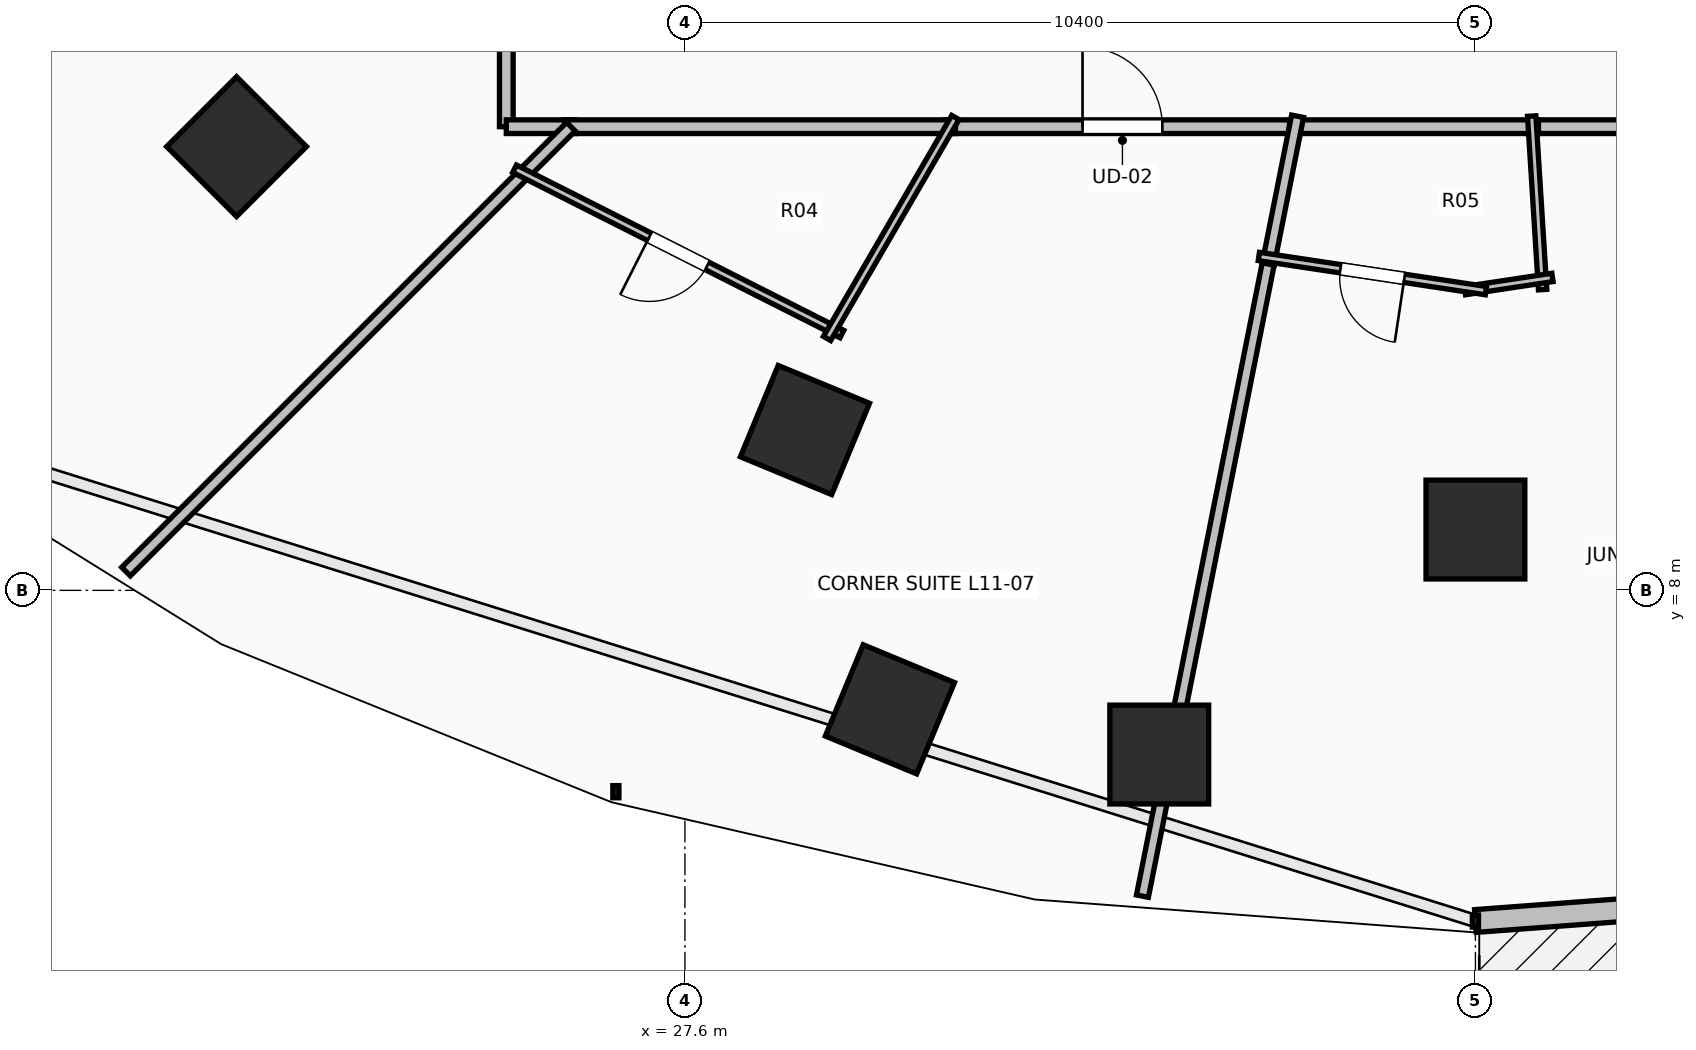
"""IFC4 building model, lengths in metres.
Left out: names, types, materials, properties, quantities, classifications, styles, units other than length and angle.
Written with IfcOpenShell. Run it as: python <this file> out.ifc"""

import sys

from ifc_helpers import new_model, si_unit, direction, frame, frame_2d, origin, origin_2d, place, context, subcontext, project, spatial, rectangle, extrude, element, fill, save


model = new_model("IFC4")
c1 = context("Model", 3, precision=1e-05, world=origin(), true_north=direction((0.0, 1.0)))
c2 = subcontext(c1, "Body", "Model", "MODEL_VIEW")
j1 = project(units=[si_unit("LENGTHUNIT", "METRE"), si_unit("PLANEANGLEUNIT", "RADIAN")], contexts=[c1])
p1 = place(None, origin())
s1 = spatial("IfcSite", under=j1, at=p1, CompositionType="ELEMENT")
p2 = place(p1, origin())
s2 = spatial("IfcBuilding", under=s1, at=p2, CompositionType="ELEMENT")
p3 = place(p2, frame((0.0, 0.0, 45.0)))
s3 = spatial("IfcBuildingStorey", under=s2, at=p3, CompositionType="ELEMENT", Elevation=45.0)
for number, where, z_axis, x_axis in (
    (1, (21.701, 13.838, 0.0), (0.0, 0.0, 1.0), (-0.707, -0.707, 0.0)),
    (2, (29.179, 10.109, 0.0), (0.0, 0.0, 1.0), (-0.383, -0.924, 0.0)),
    (3, (38.0, 8.8, 0.0), (0.0, 0.0, 1.0), (0.0, -1.0, 0.0)),
    (4, (30.297, 6.435, 0.0), (0.0, 0.0, 1.0), (-0.383, -0.924, 0.0)),
    (5, (33.84, 5.84, 0.0), (0.0, 0.0, 1.0), (0.0, -1.0, 0.0)),
):
    element("IfcColumn", number, at=place(p3, frame(where, z_axis=z_axis, x_axis=x_axis)), inside=s3, PredefinedType="COLUMN", context=c2, shape_type="SweptSolid", body=[
        extrude(rectangle(XDim=1.3, YDim=1.3, at=origin_2d()), origin(), (0.0, 0.0, 1.0), 3.5),
    ])
p4 = place(p3, frame((38.0, 3.65, 0.0), z_axis=(0.0, 0.0, 1.0), x_axis=(0.99723690101, 0.074287032943, 0.0)))
e6 = element("IfcWall", 6, at=p4, inside=s3, PredefinedType="STANDARD", context=c2, shape_type="SweptSolid", body=[
    extrude(rectangle(XDim=5.781, YDim=0.3, at=frame_2d((2.89, 0.0))), origin(), (0.0, 0.0, 1.0), 3.24),
])
p5 = place(p4, frame((2.09, 0.0, 0.0)))
e7 = element("IfcOpeningElement", 7, at=p5, cuts=e6, PredefinedType="OPENING", context=c2, shape_type="SweptSolid", body=[
    extrude(rectangle(XDim=1.6, YDim=2.3, at=frame_2d((0.8, 1.15))), frame((0.0, 0.165, 0.0), z_axis=(0.0, -1.0, 0.0), x_axis=(1.0, 0.0, 0.0)), (0.0, 0.0, 1.0), 0.33),
])
p6 = place(p3, frame((25.25, 19.814, 0.0), z_axis=(0.0, 0.0, 1.0), x_axis=(0.0, -1.0, 0.0)))
e8 = element("IfcWall", 8, at=p6, inside=s3, PredefinedType="PARTITIONING", context=c2, shape_type="SweptSolid", body=[
    extrude(rectangle(XDim=5.714, YDim=0.18, at=frame_2d((2.857, 0.0))), origin(), (0.0, 0.0, 1.0), 2.432),
])
p7 = place(p6, frame((2.332, 0.0, 0.0)))
e9 = element("IfcOpeningElement", 9, at=p7, cuts=e8, PredefinedType="OPENING", context=c2, shape_type="SweptSolid", body=[
    extrude(rectangle(XDim=1.05, YDim=2.2, at=frame_2d((0.525, 1.1))), frame((0.0, 0.105, 0.0), z_axis=(0.0, -1.0, 0.0), x_axis=(1.0, 0.0, 0.0)), (0.0, 0.0, 1.0), 0.21),
])
p8 = place(p3, frame((25.25, 14.1, 0.0), z_axis=(0.0, 0.0, 1.0), x_axis=(1.0, 0.0, 0.0)))
e10 = element("IfcWall", 10, at=p8, inside=s3, PredefinedType="PARTITIONING", context=c2, shape_type="SweptSolid", body=[
    extrude(rectangle(XDim=0.91, YDim=0.18, at=frame_2d((0.455, 0.0))), origin(), (0.0, 0.0, 1.0), 2.886),
])
p9 = place(p3, frame((31.019, 14.1, 0.0), z_axis=(0.0, 0.0, 1.0), x_axis=(1.0, 0.0, 0.0)))
e11 = element("IfcWall", 11, at=p9, inside=s3, PredefinedType="PARTITIONING", context=c2, shape_type="SweptSolid", body=[
    extrude(rectangle(XDim=4.674, YDim=0.18, at=frame_2d((2.337, 0.0))), origin(), (0.0, 0.0, 1.0), 3.24),
])
p10 = place(p9, frame((1.812, 0.0, 0.0)))
e12 = element("IfcOpeningElement", 12, at=p10, cuts=e11, PredefinedType="OPENING", context=c2, shape_type="SweptSolid", body=[
    extrude(rectangle(XDim=1.05, YDim=2.2, at=frame_2d((0.525, 1.1))), frame((0.0, 0.105, 0.0), z_axis=(0.0, -1.0, 0.0), x_axis=(1.0, 0.0, 0.0)), (0.0, 0.0, 1.0), 0.21),
])
p11 = place(p3, frame((26.02, 14.1, 0.0), z_axis=(0.0, 0.0, 1.0), x_axis=(1.0, 0.0, 0.0)))
e13 = element("IfcWall", 13, at=p11, inside=s3, PredefinedType="PARTITIONING", context=c2, shape_type="SweptSolid", body=[
    extrude(rectangle(XDim=5.139, YDim=0.18, at=frame_2d((2.569, 0.0))), origin(), (0.0, 0.0, 1.0), 2.432),
])
p12 = place(p3, frame((38.689, 14.1, 0.0), z_axis=(0.0, 0.0, 1.0), x_axis=(1.0, 0.0, 0.0)))
e14 = element("IfcWall", 14, at=p12, inside=s3, PredefinedType="PARTITIONING", context=c2, shape_type="SweptSolid", body=[
    extrude(rectangle(XDim=3.511, YDim=0.18, at=frame_2d((1.755, 0.0))), origin(), (0.0, 0.0, 1.0), 3.24),
])
p13 = place(p12, frame((1.23, 0.0, 0.0)))
e15 = element("IfcOpeningElement", 15, at=p13, cuts=e14, PredefinedType="OPENING", context=c2, shape_type="SweptSolid", body=[
    extrude(rectangle(XDim=1.05, YDim=2.2, at=frame_2d((0.525, 1.1))), frame((0.0, 0.105, 0.0), z_axis=(0.0, -1.0, 0.0), x_axis=(1.0, 0.0, 0.0)), (0.0, 0.0, 1.0), 0.21),
])
p14 = place(p3, frame((35.553, 14.1, 0.0), z_axis=(0.0, 0.0, 1.0), x_axis=(1.0, 0.0, 0.0)))
e16 = element("IfcWall", 16, at=p14, inside=s3, PredefinedType="PARTITIONING", context=c2, shape_type="SweptSolid", body=[
    extrude(rectangle(XDim=3.276, YDim=0.18, at=frame_2d((1.638, 0.0))), origin(), (0.0, 0.0, 1.0), 3.24),
])
p15 = place(p3, frame((20.247, 8.247, 0.0), z_axis=(0.0, 0.0, 1.0), x_axis=(0.707106781187, 0.707106781187, 0.0)))
e17 = element("IfcWall", 17, at=p15, inside=s3, PredefinedType="PARTITIONING", context=c2, shape_type="SweptSolid", body=[
    extrude(rectangle(XDim=8.277, YDim=0.16, at=frame_2d((4.139, 0.0))), origin(), (0.0, 0.0, 1.0), 2.624),
])
p16 = place(p3, frame((29.665, 11.372, 0.0), z_axis=(0.0, 0.0, 1.0), x_axis=(-0.892577568201, 0.450893873039, 0.0)))
e18 = element("IfcWall", 18, at=p16, inside=s3, PredefinedType="PARTITIONING", context=c2, shape_type="SweptSolid", body=[
    extrude(rectangle(XDim=4.824, YDim=0.11, at=frame_2d((2.412, 0.0))), origin(), (0.0, 0.0, 1.0), 2.432),
])
p17 = place(p16, frame((1.987, 0.0, 0.0)))
e19 = element("IfcOpeningElement", 19, at=p17, cuts=e18, PredefinedType="OPENING", context=c2, shape_type="SweptSolid", body=[
    extrude(rectangle(XDim=0.85, YDim=2.1, at=frame_2d((0.425, 1.05))), frame((0.0, 0.07, 0.0), z_axis=(0.0, -1.0, 0.0), x_axis=(1.0, 0.0, 0.0)), (0.0, 0.0, 1.0), 0.14),
])
p18 = place(p3, frame((31.158, 14.221, 0.0), z_axis=(0.0, 0.0, 1.0), x_axis=(-0.50222661214, -0.864736046466, 0.0)))
e20 = element("IfcWall", 20, at=p18, inside=s3, PredefinedType="PARTITIONING", context=c2, shape_type="SweptSolid", body=[
    extrude(rectangle(XDim=3.362, YDim=0.11, at=frame_2d((1.681, 0.0))), origin(), (0.0, 0.0, 1.0), 2.886),
])
p19 = place(p3, frame((33.619, 3.977, 0.0), z_axis=(0.0, 0.0, 1.0), x_axis=(0.195151937053, 0.980773022398, 0.0)))
e21 = element("IfcWall", 21, at=p19, inside=s3, PredefinedType="PARTITIONING", context=c2, shape_type="SweptSolid", body=[
    extrude(rectangle(XDim=8.62, YDim=0.16, at=frame_2d((4.31, 0.0))), origin(), (0.0, 0.0, 1.0), 2.972),
])
p20 = place(p3, frame((35.274, 12.294, 0.0), z_axis=(0.0, 0.0, 1.0), x_axis=(0.194907646023, 0.980821599233, 0.0)))
e22 = element("IfcWall", 22, at=p20, inside=s3, PredefinedType="PARTITIONING", context=c2, shape_type="SweptSolid", body=[
    extrude(rectangle(XDim=1.982, YDim=0.16, at=frame_2d((0.991, 0.0))), origin(), (0.0, 0.0, 1.0), 2.886),
])
p21 = place(p3, frame((38.74, 14.24, 0.0), z_axis=(0.0, 0.0, 1.0), x_axis=(0.062743659702, -0.998029675494, 0.0)))
e23 = element("IfcWall", 23, at=p21, inside=s3, PredefinedType="PARTITIONING", context=c2, shape_type="SweptSolid", body=[
    extrude(rectangle(XDim=2.288, YDim=0.11, at=frame_2d((1.144, 0.0))), origin(), (0.0, 0.0, 1.0), 2.886),
])
p22 = place(p3, frame((39.013, 12.117, 0.0), z_axis=(0.0, 0.0, 1.0), x_axis=(-0.988803754909, -0.14922176208, 0.0)))
e24 = element("IfcWall", 24, at=p22, inside=s3, PredefinedType="PARTITIONING", context=c2, shape_type="SweptSolid", body=[
    extrude(rectangle(XDim=1.165, YDim=0.11, at=frame_2d((0.583, 0.0))), origin(), (0.0, 0.0, 1.0), 3.24),
])
p23 = place(p3, frame((38.138, 11.943, 0.0), z_axis=(0.0, 0.0, 1.0), x_axis=(-0.988861549405, 0.148838288446, 0.0)))
e25 = element("IfcWall", 25, at=p23, inside=s3, PredefinedType="PARTITIONING", context=c2, shape_type="SweptSolid", body=[
    extrude(rectangle(XDim=3.021, YDim=0.11, at=frame_2d((1.511, 0.0))), origin(), (0.0, 0.0, 1.0), 3.24),
])
p24 = place(p23, frame((1.086, 0.0, 0.0)))
e26 = element("IfcOpeningElement", 26, at=p24, cuts=e25, PredefinedType="OPENING", context=c2, shape_type="SweptSolid", body=[
    extrude(rectangle(XDim=0.85, YDim=2.1, at=frame_2d((0.425, 1.05))), frame((0.0, 0.07, 0.0), z_axis=(0.0, -1.0, 0.0), x_axis=(1.0, 0.0, 0.0)), (0.0, 0.0, 1.0), 0.14),
])
p25 = place(p10, origin())
e27 = element("IfcDoor", 27, at=p25, inside=s3, OperationType="SINGLE_SWING_LEFT", PredefinedType="DOOR", context=c2, shape_type="SweptSolid", body=[
    extrude(rectangle(XDim=1.05, YDim=2.2, at=frame_2d((0.525, 1.1))), frame((0.0, 0.025, 0.0), z_axis=(0.0, -1.0, 0.0), x_axis=(1.0, 0.0, 0.0)), (0.0, 0.0, 1.0), 0.05),
])
fill(e12, e27)
p26 = place(p17, origin())
e28 = element("IfcDoor", 28, at=p26, inside=s3, OperationType="SINGLE_SWING_RIGHT", PredefinedType="DOOR", context=c2, shape_type="SweptSolid", body=[
    extrude(rectangle(XDim=0.85, YDim=2.1, at=frame_2d((0.425, 1.05))), frame((0.0, 0.025, 0.0), z_axis=(0.0, -1.0, 0.0), x_axis=(1.0, 0.0, 0.0)), (0.0, 0.0, 1.0), 0.05),
])
fill(e19, e28)
p27 = place(p24, origin())
e29 = element("IfcDoor", 29, at=p27, inside=s3, OperationType="SINGLE_SWING_LEFT", PredefinedType="DOOR", context=c2, shape_type="SweptSolid", body=[
    extrude(rectangle(XDim=0.85, YDim=2.1, at=frame_2d((0.425, 1.05))), frame((0.0, 0.025, 0.0), z_axis=(0.0, -1.0, 0.0), x_axis=(1.0, 0.0, 0.0)), (0.0, 0.0, 1.0), 0.05),
])
fill(e26, e29)
save(model, sys.argv[1])
